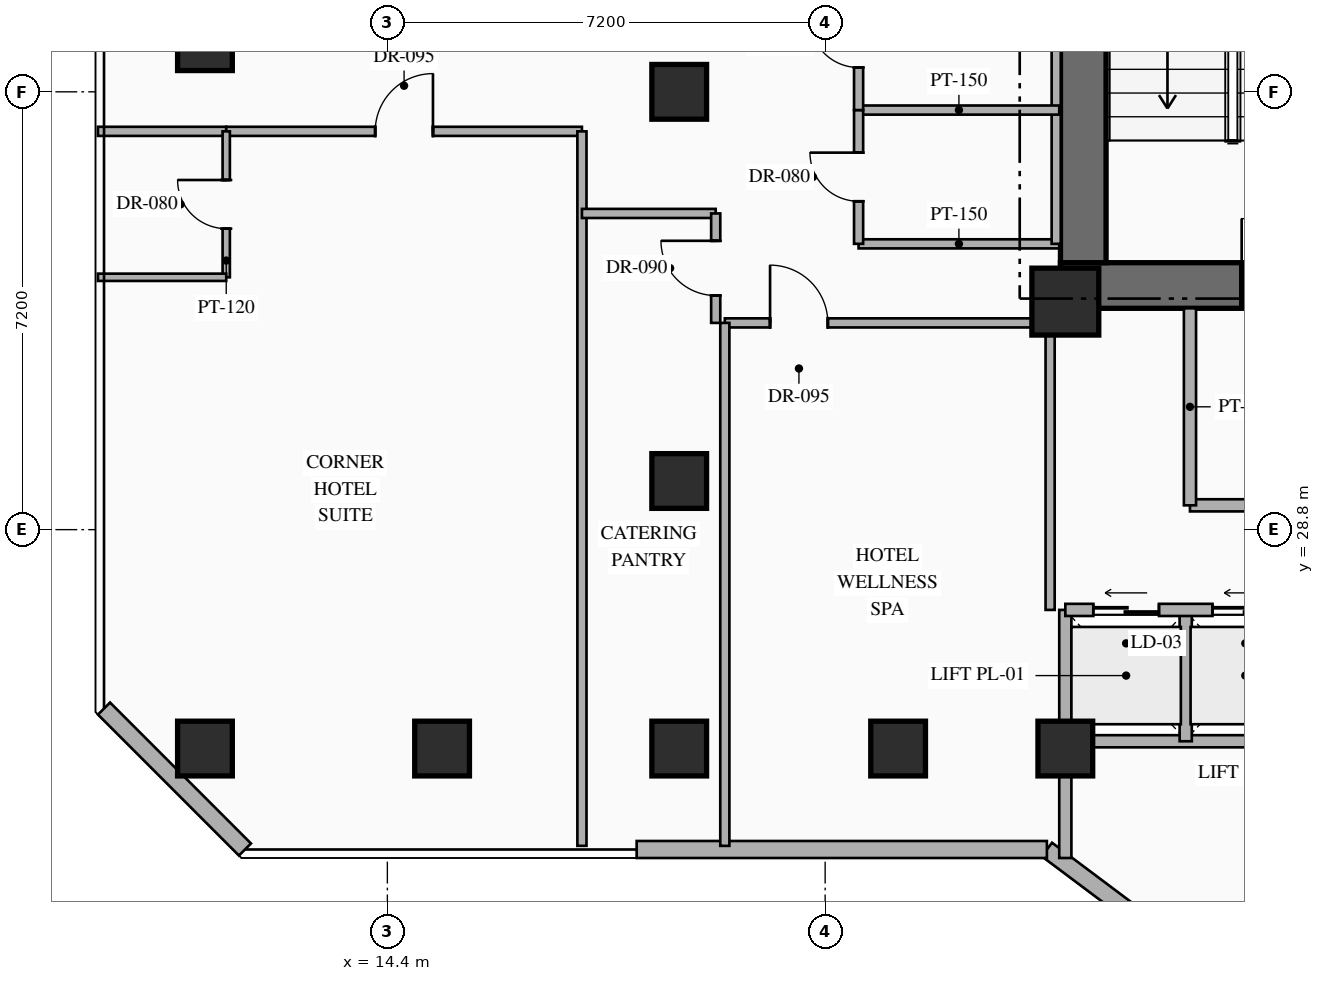
"""IFC4 building model, lengths in metres.
Left out: names, types, materials, properties, quantities, classifications, styles, units other than length and angle.
Written with IfcOpenShell. Run it as: python <this file> out.ifc"""

import sys

from ifc_helpers import new_model, si_unit, direction, frame, frame_2d, origin, origin_2d, place, context, subcontext, project, spatial, rectangle, hollow_rectangle, extrude, element, fill, save


model = new_model("IFC4")
c1 = context("Model", 3, precision=1e-05, world=origin(), true_north=direction((0.0, 1.0)))
c2 = subcontext(c1, "Body", "Model", "MODEL_VIEW")
j1 = project(units=[si_unit("LENGTHUNIT", "METRE"), si_unit("PLANEANGLEUNIT", "RADIAN")], contexts=[c1])
p1 = place(None, origin())
s1 = spatial("IfcSite", under=j1, at=p1, CompositionType="ELEMENT")
p2 = place(p1, origin())
s2 = spatial("IfcBuilding", under=s1, at=p2, CompositionType="ELEMENT")
p3 = place(p2, frame((0.0, 0.0, 77.95)))
s3 = spatial("IfcBuildingStorey", under=s2, at=p3, CompositionType="ELEMENT", Elevation=77.95)
p4 = place(p3, frame((25.47, 32.815, 0.0), z_axis=(0.0, 0.0, 1.0), x_axis=(1.0, 0.0, 0.0)))
e1 = element("IfcWall", 1, at=p4, inside=s3, PredefinedType="SHEAR", context=c2, shape_type="SweptSolid", body=[
    extrude(rectangle(XDim=8.08, YDim=0.75, at=frame_2d((4.04, 0.0))), origin(), (0.0, 0.0, 1.0), 3.35),
])
p5 = place(p4, frame((2.98, 0.0, 0.0)))
e2 = element("IfcOpeningElement", 2, at=p5, cuts=e1, PredefinedType="OPENING", context=c2, shape_type="SweptSolid", body=[
    extrude(rectangle(XDim=1.1, YDim=2.2, at=frame_2d((0.55, 1.1))), frame((0.0, 0.385, 0.0), z_axis=(0.0, -1.0, 0.0), x_axis=(1.0, 0.0, 0.0)), (0.0, 0.0, 1.0), 0.77),
])
p6 = place(p4, frame((5.73, 0.0, 0.0)))
e3 = element("IfcOpeningElement", 3, at=p6, cuts=e1, PredefinedType="OPENING", context=c2, shape_type="SweptSolid", body=[
    extrude(rectangle(XDim=1.1, YDim=2.15, at=frame_2d((0.55, 1.075))), frame((0.0, 0.385, 0.0), z_axis=(0.0, -1.0, 0.0), x_axis=(1.0, 0.0, 0.0)), (0.0, 0.0, 1.0), 0.77),
])
p7 = place(p3, frame((25.845, 33.19, 0.0), z_axis=(0.0, 0.0, 1.0), x_axis=(0.0, 1.0, 0.0)))
e4 = element("IfcWall", 4, at=p7, inside=s3, PredefinedType="SHEAR", context=c2, shape_type="SweptSolid", body=[
    extrude(rectangle(XDim=9.48, YDim=0.75, at=frame_2d((4.74, 0.0))), origin(), (0.0, 0.0, 1.0), 3.35),
])
p8 = place(p3, frame((25.55, 32.55, 0.0), z_axis=(0.0, 0.0, 1.0), x_axis=(1.0, 0.0, 0.0)))
e5 = element("IfcColumn", 5, at=p8, inside=s3, PredefinedType="COLUMN", context=c2, shape_type="SweptSolid", body=[
    extrude(rectangle(XDim=1.1, YDim=1.1, at=origin_2d()), origin(), (0.0, 0.0, 1.0), 3.35),
])
for number, where, z_axis, x_axis in (
    (6, (25.55, 25.2, 0.0), (0.0, 0.0, 1.0), (1.0, 0.0, 0.0)),
    (7, (11.4, 25.2, 0.0), (0.0, 0.0, 1.0), (1.0, 0.0, 0.0)),
    (8, (19.2, 25.2, 0.0), (0.0, 0.0, 1.0), (1.0, 0.0, 0.0)),
    (9, (19.2, 29.6, 0.0), (0.0, 0.0, 1.0), (1.0, 0.0, 0.0)),
    (10, (22.8, 25.2, 0.0), (0.0, 0.0, 1.0), (1.0, 0.0, 0.0)),
    (11, (11.4, 36.8, 0.0), (0.0, 0.0, 1.0), (1.0, 0.0, 0.0)),
    (12, (19.2, 36.0, 0.0), (0.0, 0.0, 1.0), (1.0, 0.0, 0.0)),
    (13, (15.3, 25.2, 0.0), (0.0, 0.0, 1.0), (1.0, 0.0, 0.0)),
):
    element("IfcColumn", number, at=place(p3, frame(where, z_axis=z_axis, x_axis=x_axis)), inside=s3, PredefinedType="COLUMN", context=c2, shape_type="SweptSolid", body=[
        extrude(hollow_rectangle(XDim=0.9, YDim=0.9, WallThickness=0.036, at=origin_2d()), origin(), (0.0, 0.0, 1.0), 3.35),
    ])
p9 = place(p3, frame((53.318, 2.487, 0.0), z_axis=(0.0, 0.0, 1.0), x_axis=(-0.800004174678, 0.599994433723, 0.0)))
e14 = element("IfcWall", 14, at=p9, inside=s3, PredefinedType="STANDARD", context=c2, shape_type="SweptSolid", body=[
    extrude(rectangle(XDim=35.089, YDim=0.28, at=frame_2d((17.544, 0.0))), origin(), (0.0, 0.0, 1.0), 3.13),
])
p10 = place(p9, frame((1.931, 0.0, 0.85)))
e15 = element("IfcOpeningElement", 15, at=p10, cuts=e14, PredefinedType="OPENING", context=c2, shape_type="SweptSolid", body=[
    extrude(rectangle(XDim=1.4, YDim=1.8, at=frame_2d((0.7, 0.9))), frame((0.0, 0.15, 0.0), z_axis=(0.0, -1.0, 0.0), x_axis=(1.0, 0.0, 0.0)), (0.0, 0.0, 1.0), 0.3),
])
p11 = place(p9, frame((6.819, 0.0, 0.85)))
e16 = element("IfcOpeningElement", 16, at=p11, cuts=e14, PredefinedType="OPENING", context=c2, shape_type="SweptSolid", body=[
    extrude(rectangle(XDim=1.4, YDim=1.8, at=frame_2d((0.7, 0.9))), frame((0.0, 0.15, 0.0), z_axis=(0.0, -1.0, 0.0), x_axis=(1.0, 0.0, 0.0)), (0.0, 0.0, 1.0), 0.3),
])
p12 = place(p9, frame((11.832, 0.0, 0.85)))
e17 = element("IfcOpeningElement", 17, at=p12, cuts=e14, PredefinedType="OPENING", context=c2, shape_type="SweptSolid", body=[
    extrude(rectangle(XDim=1.4, YDim=1.8, at=frame_2d((0.7, 0.9))), frame((0.0, 0.15, 0.0), z_axis=(0.0, -1.0, 0.0), x_axis=(1.0, 0.0, 0.0)), (0.0, 0.0, 1.0), 0.3),
])
p13 = place(p9, frame((17.647, 0.0, 0.85)))
e18 = element("IfcOpeningElement", 18, at=p13, cuts=e14, PredefinedType="OPENING", context=c2, shape_type="SweptSolid", body=[
    extrude(rectangle(XDim=1.4, YDim=1.8, at=frame_2d((0.7, 0.9))), frame((0.0, 0.15, 0.0), z_axis=(0.0, -1.0, 0.0), x_axis=(1.0, 0.0, 0.0)), (0.0, 0.0, 1.0), 0.3),
])
p14 = place(p9, frame((21.857, 0.0, 0.85)))
e19 = element("IfcOpeningElement", 19, at=p14, cuts=e14, PredefinedType="OPENING", context=c2, shape_type="SweptSolid", body=[
    extrude(rectangle(XDim=1.4, YDim=1.8, at=frame_2d((0.7, 0.9))), frame((0.0, 0.15, 0.0), z_axis=(0.0, -1.0, 0.0), x_axis=(1.0, 0.0, 0.0)), (0.0, 0.0, 1.0), 0.3),
])
p15 = place(p9, frame((26.87, 0.0, 0.85)))
e20 = element("IfcOpeningElement", 20, at=p15, cuts=e14, PredefinedType="OPENING", context=c2, shape_type="SweptSolid", body=[
    extrude(rectangle(XDim=1.4, YDim=1.8, at=frame_2d((0.7, 0.9))), frame((0.0, 0.15, 0.0), z_axis=(0.0, -1.0, 0.0), x_axis=(1.0, 0.0, 0.0)), (0.0, 0.0, 1.0), 0.3),
])
p16 = place(p9, frame((31.757, 0.0, 0.85)))
e21 = element("IfcOpeningElement", 21, at=p16, cuts=e14, PredefinedType="OPENING", context=c2, shape_type="SweptSolid", body=[
    extrude(rectangle(XDim=1.4, YDim=1.8, at=frame_2d((0.7, 0.9))), frame((0.0, 0.15, 0.0), z_axis=(0.0, -1.0, 0.0), x_axis=(1.0, 0.0, 0.0)), (0.0, 0.0, 1.0), 0.3),
])
p17 = place(p3, frame((25.247, 23.54, 0.0), z_axis=(0.0, 0.0, 1.0), x_axis=(-1.0, 0.0, 0.0)))
e22 = element("IfcWall", 22, at=p17, inside=s3, PredefinedType="STANDARD", context=c2, shape_type="SweptSolid", body=[
    extrude(rectangle(XDim=6.747, YDim=0.28, at=frame_2d((3.374, 0.0))), origin(), (0.0, 0.0, 1.0), 3.13),
])
p18 = place(p3, frame((12.058, 23.54, 0.0), z_axis=(0.0, 0.0, 1.0), x_axis=(-0.707144017911, 0.707069542501, 0.0)))
e23 = element("IfcWall", 23, at=p18, inside=s3, PredefinedType="STANDARD", context=c2, shape_type="SweptSolid", body=[
    extrude(rectangle(XDim=3.278, YDim=0.28, at=frame_2d((1.639, 0.0))), origin(), (0.0, 0.0, 1.0), 3.13),
])
p19 = place(p3, frame((27.6, 29.2, 0.0), z_axis=(0.0, 0.0, 1.0), x_axis=(1.0, 0.0, 0.0)))
e24 = element("IfcWall", 24, at=p19, inside=s3, PredefinedType="STANDARD", context=c2, shape_type="SweptSolid", body=[
    extrude(rectangle(XDim=5.15, YDim=0.2, at=frame_2d((2.575, 0.0))), origin(), (0.0, 0.0, 1.0), 3.13),
])
p20 = place(p3, frame((27.6, 29.2, 0.0), z_axis=(0.0, 0.0, 1.0), x_axis=(0.0, 1.0, 0.0)))
e25 = element("IfcWall", 25, at=p20, inside=s3, PredefinedType="STANDARD", context=c2, shape_type="SweptSolid", body=[
    extrude(rectangle(XDim=3.24, YDim=0.2, at=frame_2d((1.62, 0.0))), origin(), (0.0, 0.0, 1.0), 3.13),
])
p21 = place(p3, frame((25.55, 23.4, 0.0), z_axis=(0.0, 0.0, 1.0), x_axis=(0.0, 1.0, 0.0)))
e26 = element("IfcWall", 26, at=p21, inside=s3, PredefinedType="STANDARD", context=c2, shape_type="SweptSolid", body=[
    extrude(rectangle(XDim=4.08, YDim=0.2, at=frame_2d((2.04, 0.0))), origin(), (0.0, 0.0, 1.0), 2.425),
])
p22 = place(p3, frame((25.55, 25.32, 0.0), z_axis=(0.0, 0.0, 1.0), x_axis=(1.0, 0.0, 0.0)))
e27 = element("IfcWall", 27, at=p22, inside=s3, PredefinedType="STANDARD", context=c2, shape_type="SweptSolid", body=[
    extrude(rectangle(XDim=7.88, YDim=0.2, at=frame_2d((3.94, 0.0))), origin(), (0.0, 0.0, 1.0), 2.525),
])
p23 = place(p3, frame((27.53, 25.32, 0.0), z_axis=(0.0, 0.0, 1.0), x_axis=(0.0, 1.0, 0.0)))
e28 = element("IfcWall", 28, at=p23, inside=s3, PredefinedType="STANDARD", context=c2, shape_type="SweptSolid", body=[
    extrude(rectangle(XDim=2.16, YDim=0.2, at=frame_2d((1.08, 0.0))), origin(), (0.0, 0.0, 1.0), 3.13),
])
p24 = place(p3, frame((25.55, 27.48, 0.0), z_axis=(0.0, 0.0, 1.0), x_axis=(1.0, 0.0, 0.0)))
e29 = element("IfcWall", 29, at=p24, inside=s3, PredefinedType="STANDARD", context=c2, shape_type="SweptSolid", body=[
    extrude(rectangle(XDim=7.88, YDim=0.2, at=frame_2d((3.94, 0.0))), origin(), (0.0, 0.0, 1.0), 3.13),
])
p25 = place(p24, frame((0.46, 0.0, 0.0)))
e30 = element("IfcOpeningElement", 30, at=p25, cuts=e29, PredefinedType="OPENING", context=c2, shape_type="SweptSolid", body=[
    extrude(rectangle(XDim=1.08, YDim=2.15, at=frame_2d((0.54, 1.075))), frame((0.0, 0.11, 0.0), z_axis=(0.0, -1.0, 0.0), x_axis=(1.0, 0.0, 0.0)), (0.0, 0.0, 1.0), 0.22),
])
p26 = place(p24, frame((2.42, 0.0, 0.0)))
e31 = element("IfcOpeningElement", 31, at=p26, cuts=e29, PredefinedType="OPENING", context=c2, shape_type="SweptSolid", body=[
    extrude(rectangle(XDim=1.08, YDim=2.15, at=frame_2d((0.54, 1.075))), frame((0.0, 0.11, 0.0), z_axis=(0.0, -1.0, 0.0), x_axis=(1.0, 0.0, 0.0)), (0.0, 0.0, 1.0), 0.22),
])
p27 = place(p24, frame((4.38, 0.0, 0.0)))
e32 = element("IfcOpeningElement", 32, at=p27, cuts=e29, PredefinedType="OPENING", context=c2, shape_type="SweptSolid", body=[
    extrude(rectangle(XDim=1.08, YDim=2.15, at=frame_2d((0.54, 1.075))), frame((0.0, 0.11, 0.0), z_axis=(0.0, -1.0, 0.0), x_axis=(1.0, 0.0, 0.0)), (0.0, 0.0, 1.0), 0.22),
])
p28 = place(p24, frame((6.34, 0.0, 0.0)))
e33 = element("IfcOpeningElement", 33, at=p28, cuts=e29, PredefinedType="OPENING", context=c2, shape_type="SweptSolid", body=[
    extrude(rectangle(XDim=1.08, YDim=2.15, at=frame_2d((0.54, 1.075))), frame((0.0, 0.11, 0.0), z_axis=(0.0, -1.0, 0.0), x_axis=(1.0, 0.0, 0.0)), (0.0, 0.0, 1.0), 0.22),
])
p29 = place(p3, frame((22.15, 33.5, 0.0), z_axis=(0.0, 0.0, 1.0), x_axis=(1.0, 0.0, 0.0)))
e34 = element("IfcWall", 34, at=p29, inside=s3, PredefinedType="PARTITIONING", context=c2, shape_type="SweptSolid", body=[
    extrude(rectangle(XDim=3.3, YDim=0.15, at=frame_2d((1.65, 0.0))), origin(), (0.0, 0.0, 1.0), 3.13),
])
p30 = place(p3, frame((25.4, 33.5, 0.0), z_axis=(0.0, 0.0, 1.0), x_axis=(0.0, 1.0, 0.0)))
e35 = element("IfcWall", 35, at=p30, inside=s3, PredefinedType="PARTITIONING", context=c2, shape_type="SweptSolid", body=[
    extrude(rectangle(XDim=6.6, YDim=0.15, at=frame_2d((3.3, 0.0))), origin(), (0.0, 0.0, 1.0), 3.13),
])
p31 = place(p3, frame((22.15, 35.7, 0.0), z_axis=(0.0, 0.0, 1.0), x_axis=(1.0, 0.0, 0.0)))
e36 = element("IfcWall", 36, at=p31, inside=s3, PredefinedType="PARTITIONING", context=c2, shape_type="SweptSolid", body=[
    extrude(rectangle(XDim=3.3, YDim=0.15, at=frame_2d((1.65, 0.0))), origin(), (0.0, 0.0, 1.0), 3.13),
])
p32 = place(p3, frame((22.15, 33.5, 0.0), z_axis=(0.0, 0.0, 1.0), x_axis=(0.0, 1.0, 0.0)))
e37 = element("IfcWall", 37, at=p32, inside=s3, PredefinedType="PARTITIONING", context=c2, shape_type="SweptSolid", body=[
    extrude(rectangle(XDim=2.2, YDim=0.15, at=frame_2d((1.1, 0.0))), origin(), (0.0, 0.0, 1.0), 3.13),
])
p33 = place(p32, frame((0.7, 0.0, 0.0)))
e38 = element("IfcOpeningElement", 38, at=p33, cuts=e37, PredefinedType="OPENING", context=c2, shape_type="SweptSolid", body=[
    extrude(rectangle(XDim=0.8, YDim=2.06, at=frame_2d((0.4, 1.03))), frame((0.0, 0.085, 0.0), z_axis=(0.0, -1.0, 0.0), x_axis=(1.0, 0.0, 0.0)), (0.0, 0.0, 1.0), 0.17),
])
p34 = place(p3, frame((22.15, 35.7, 0.0), z_axis=(0.0, 0.0, 1.0), x_axis=(0.0, 1.0, 0.0)))
e39 = element("IfcWall", 39, at=p34, inside=s3, PredefinedType="PARTITIONING", context=c2, shape_type="SweptSolid", body=[
    extrude(rectangle(XDim=2.2, YDim=0.15, at=frame_2d((1.1, 0.0))), origin(), (0.0, 0.0, 1.0), 3.13),
])
p35 = place(p34, frame((0.7, 0.0, 0.0)))
e40 = element("IfcOpeningElement", 40, at=p35, cuts=e39, PredefinedType="OPENING", context=c2, shape_type="SweptSolid", body=[
    extrude(rectangle(XDim=0.8, YDim=2.06, at=frame_2d((0.4, 1.03))), frame((0.0, 0.085, 0.0), z_axis=(0.0, -1.0, 0.0), x_axis=(1.0, 0.0, 0.0)), (0.0, 0.0, 1.0), 0.17),
])
p36 = place(p3, frame((19.95, 32.2, 0.0), z_axis=(0.0, 0.0, 1.0), x_axis=(1.0, 0.0, 0.0)))
e41 = element("IfcWall", 41, at=p36, inside=s3, PredefinedType="PARTITIONING", context=c2, shape_type="SweptSolid", body=[
    extrude(rectangle(XDim=5.35, YDim=0.15, at=frame_2d((2.675, 0.0))), origin(), (0.0, 0.0, 1.0), 3.13),
])
p37 = place(p36, frame((0.744, 0.0, 0.0)))
e42 = element("IfcOpeningElement", 42, at=p37, cuts=e41, PredefinedType="OPENING", context=c2, shape_type="SweptSolid", body=[
    extrude(rectangle(XDim=0.95, YDim=2.15, at=frame_2d((0.475, 1.075))), frame((0.0, 0.085, 0.0), z_axis=(0.0, -1.0, 0.0), x_axis=(1.0, 0.0, 0.0)), (0.0, 0.0, 1.0), 0.17),
])
p38 = place(p3, frame((19.95, 23.6, 0.0), z_axis=(0.0, 0.0, 1.0), x_axis=(0.0, 1.0, 0.0)))
e43 = element("IfcWall", 43, at=p38, inside=s3, PredefinedType="PARTITIONING", context=c2, shape_type="SweptSolid", body=[
    extrude(rectangle(XDim=8.6, YDim=0.15, at=frame_2d((4.3, 0.0))), origin(), (0.0, 0.0, 1.0), 3.13),
])
p39 = place(p3, frame((25.3, 27.48, 0.0), z_axis=(0.0, 0.0, 1.0), x_axis=(0.0, 1.0, 0.0)))
e44 = element("IfcWall", 44, at=p39, inside=s3, PredefinedType="PARTITIONING", context=c2, shape_type="SweptSolid", body=[
    extrude(rectangle(XDim=4.72, YDim=0.15, at=frame_2d((2.36, 0.0))), origin(), (0.0, 0.0, 1.0), 2.425),
])
p40 = place(p3, frame((9.64, 35.35, 0.0), z_axis=(0.0, 0.0, 1.0), x_axis=(1.0, 0.0, 0.0)))
e45 = element("IfcWall", 45, at=p40, inside=s3, PredefinedType="PARTITIONING", context=c2, shape_type="SweptSolid", body=[
    extrude(rectangle(XDim=2.11, YDim=0.15, at=frame_2d((1.055, 0.0))), origin(), (0.0, 0.0, 1.0), 3.13),
])
p41 = place(p3, frame((11.75, 35.35, 0.0), z_axis=(0.0, 0.0, 1.0), x_axis=(1.0, 0.0, 0.0)))
e46 = element("IfcWall", 46, at=p41, inside=s3, PredefinedType="PARTITIONING", context=c2, shape_type="SweptSolid", body=[
    extrude(rectangle(XDim=5.85, YDim=0.15, at=frame_2d((2.925, 0.0))), origin(), (0.0, 0.0, 1.0), 3.13),
])
p42 = place(p41, frame((2.45, 0.0, 0.0)))
e47 = element("IfcOpeningElement", 47, at=p42, cuts=e46, PredefinedType="OPENING", context=c2, shape_type="SweptSolid", body=[
    extrude(rectangle(XDim=0.95, YDim=2.15, at=frame_2d((0.475, 1.075))), frame((0.0, 0.085, 0.0), z_axis=(0.0, -1.0, 0.0), x_axis=(1.0, 0.0, 0.0)), (0.0, 0.0, 1.0), 0.17),
])
p43 = place(p3, frame((11.75, 32.95, 0.0), z_axis=(0.0, 0.0, 1.0), x_axis=(0.0, 1.0, 0.0)))
e48 = element("IfcWall", 48, at=p43, inside=s3, PredefinedType="PARTITIONING", context=c2, shape_type="SweptSolid", body=[
    extrude(rectangle(XDim=2.4, YDim=0.12, at=frame_2d((1.2, 0.0))), origin(), (0.0, 0.0, 1.0), 3.13),
])
p44 = place(p43, frame((0.8, 0.0, 0.0)))
e49 = element("IfcOpeningElement", 49, at=p44, cuts=e48, PredefinedType="OPENING", context=c2, shape_type="SweptSolid", body=[
    extrude(rectangle(XDim=0.8, YDim=2.06, at=frame_2d((0.4, 1.03))), frame((0.0, 0.07, 0.0), z_axis=(0.0, -1.0, 0.0), x_axis=(1.0, 0.0, 0.0)), (0.0, 0.0, 1.0), 0.14),
])
p45 = place(p3, frame((9.64, 32.95, 0.0), z_axis=(0.0, 0.0, 1.0), x_axis=(1.0, 0.0, 0.0)))
e50 = element("IfcWall", 50, at=p45, inside=s3, PredefinedType="PARTITIONING", context=c2, shape_type="SweptSolid", body=[
    extrude(rectangle(XDim=2.11, YDim=0.12, at=frame_2d((1.055, 0.0))), origin(), (0.0, 0.0, 1.0), 3.13),
])
p46 = place(p3, frame((17.6, 23.6, 0.0), z_axis=(0.0, 0.0, 1.0), x_axis=(0.0, 1.0, 0.0)))
e51 = element("IfcWall", 51, at=p46, inside=s3, PredefinedType="PARTITIONING", context=c2, shape_type="SweptSolid", body=[
    extrude(rectangle(XDim=11.75, YDim=0.15, at=frame_2d((5.875, 0.0))), origin(), (0.0, 0.0, 1.0), 3.13),
])
p47 = place(p3, frame((17.6, 34.0, 0.0), z_axis=(0.0, 0.0, 1.0), x_axis=(1.0, 0.0, 0.0)))
e52 = element("IfcWall", 52, at=p47, inside=s3, PredefinedType="PARTITIONING", context=c2, shape_type="SweptSolid", body=[
    extrude(rectangle(XDim=2.2, YDim=0.15, at=frame_2d((1.1, 0.0))), origin(), (0.0, 0.0, 1.0), 3.13),
])
p48 = place(p3, frame((19.8, 32.2, 0.0), z_axis=(0.0, 0.0, 1.0), x_axis=(0.0, 1.0, 0.0)))
e53 = element("IfcWall", 53, at=p48, inside=s3, PredefinedType="PARTITIONING", context=c2, shape_type="SweptSolid", body=[
    extrude(rectangle(XDim=1.8, YDim=0.15, at=frame_2d((0.9, 0.0))), origin(), (0.0, 0.0, 1.0), 3.13),
])
p49 = place(p48, frame((0.45, 0.0, 0.0)))
e54 = element("IfcOpeningElement", 54, at=p49, cuts=e53, PredefinedType="OPENING", context=c2, shape_type="SweptSolid", body=[
    extrude(rectangle(XDim=0.9, YDim=2.15, at=frame_2d((0.45, 1.075))), frame((0.0, 0.085, 0.0), z_axis=(0.0, -1.0, 0.0), x_axis=(1.0, 0.0, 0.0)), (0.0, 0.0, 1.0), 0.17),
])
p50 = place(p5, origin())
e55 = element("IfcDoor", 55, at=p50, inside=s3, OperationType="SINGLE_SWING_LEFT", PredefinedType="DOOR", context=c2, shape_type="SweptSolid", body=[
    extrude(rectangle(XDim=1.1, YDim=2.2, at=frame_2d((0.55, 1.1))), frame((0.0, 0.025, 0.0), z_axis=(0.0, -1.0, 0.0), x_axis=(1.0, 0.0, 0.0)), (0.0, 0.0, 1.0), 0.05),
])
fill(e2, e55)
p51 = place(p25, origin())
e56 = element("IfcDoor", 56, at=p51, inside=s3, OperationType="SLIDING_TO_LEFT", PredefinedType="USERDEFINED", context=c2, shape_type="SweptSolid", body=[
    extrude(rectangle(XDim=1.08, YDim=2.15, at=frame_2d((0.54, 1.075))), frame((0.0, 0.025, 0.0), z_axis=(0.0, -1.0, 0.0), x_axis=(1.0, 0.0, 0.0)), (0.0, 0.0, 1.0), 0.05),
])
fill(e30, e56)
p52 = place(p26, origin())
e57 = element("IfcDoor", 57, at=p52, inside=s3, OperationType="SLIDING_TO_LEFT", PredefinedType="USERDEFINED", context=c2, shape_type="SweptSolid", body=[
    extrude(rectangle(XDim=1.08, YDim=2.15, at=frame_2d((0.54, 1.075))), frame((0.0, 0.025, 0.0), z_axis=(0.0, -1.0, 0.0), x_axis=(1.0, 0.0, 0.0)), (0.0, 0.0, 1.0), 0.05),
])
fill(e31, e57)
p53 = place(p33, origin())
e58 = element("IfcDoor", 58, at=p53, inside=s3, OperationType="SINGLE_SWING_RIGHT", PredefinedType="DOOR", context=c2, shape_type="SweptSolid", body=[
    extrude(rectangle(XDim=0.8, YDim=2.06, at=frame_2d((0.4, 1.03))), frame((0.0, 0.025, 0.0), z_axis=(0.0, -1.0, 0.0), x_axis=(1.0, 0.0, 0.0)), (0.0, 0.0, 1.0), 0.05),
])
fill(e38, e58)
p54 = place(p35, origin())
e59 = element("IfcDoor", 59, at=p54, inside=s3, OperationType="SINGLE_SWING_RIGHT", PredefinedType="DOOR", context=c2, shape_type="SweptSolid", body=[
    extrude(rectangle(XDim=0.8, YDim=2.06, at=frame_2d((0.4, 1.03))), frame((0.0, 0.025, 0.0), z_axis=(0.0, -1.0, 0.0), x_axis=(1.0, 0.0, 0.0)), (0.0, 0.0, 1.0), 0.05),
])
fill(e40, e59)
p55 = place(p37, origin())
e60 = element("IfcDoor", 60, at=p55, inside=s3, OperationType="SINGLE_SWING_LEFT", PredefinedType="DOOR", context=c2, shape_type="SweptSolid", body=[
    extrude(rectangle(XDim=0.95, YDim=2.15, at=frame_2d((0.475, 1.075))), frame((0.0, 0.025, 0.0), z_axis=(0.0, -1.0, 0.0), x_axis=(1.0, 0.0, 0.0)), (0.0, 0.0, 1.0), 0.05),
])
fill(e42, e60)
p56 = place(p42, origin())
e61 = element("IfcDoor", 61, at=p56, inside=s3, OperationType="SINGLE_SWING_RIGHT", PredefinedType="DOOR", context=c2, shape_type="SweptSolid", body=[
    extrude(rectangle(XDim=0.95, YDim=2.15, at=frame_2d((0.475, 1.075))), frame((0.0, 0.025, 0.0), z_axis=(0.0, -1.0, 0.0), x_axis=(1.0, 0.0, 0.0)), (0.0, 0.0, 1.0), 0.05),
])
fill(e47, e61)
p57 = place(p44, origin())
e62 = element("IfcDoor", 62, at=p57, inside=s3, OperationType="SINGLE_SWING_RIGHT", PredefinedType="DOOR", context=c2, shape_type="SweptSolid", body=[
    extrude(rectangle(XDim=0.8, YDim=2.06, at=frame_2d((0.4, 1.03))), frame((0.0, 0.025, 0.0), z_axis=(0.0, -1.0, 0.0), x_axis=(1.0, 0.0, 0.0)), (0.0, 0.0, 1.0), 0.05),
])
fill(e49, e62)
p58 = place(p49, origin())
e63 = element("IfcDoor", 63, at=p58, inside=s3, OperationType="SINGLE_SWING_RIGHT", PredefinedType="DOOR", context=c2, shape_type="SweptSolid", body=[
    extrude(rectangle(XDim=0.9, YDim=2.15, at=frame_2d((0.45, 1.075))), frame((0.0, 0.025, 0.0), z_axis=(0.0, -1.0, 0.0), x_axis=(1.0, 0.0, 0.0)), (0.0, 0.0, 1.0), 0.05),
])
fill(e54, e63)
save(model, sys.argv[1])
